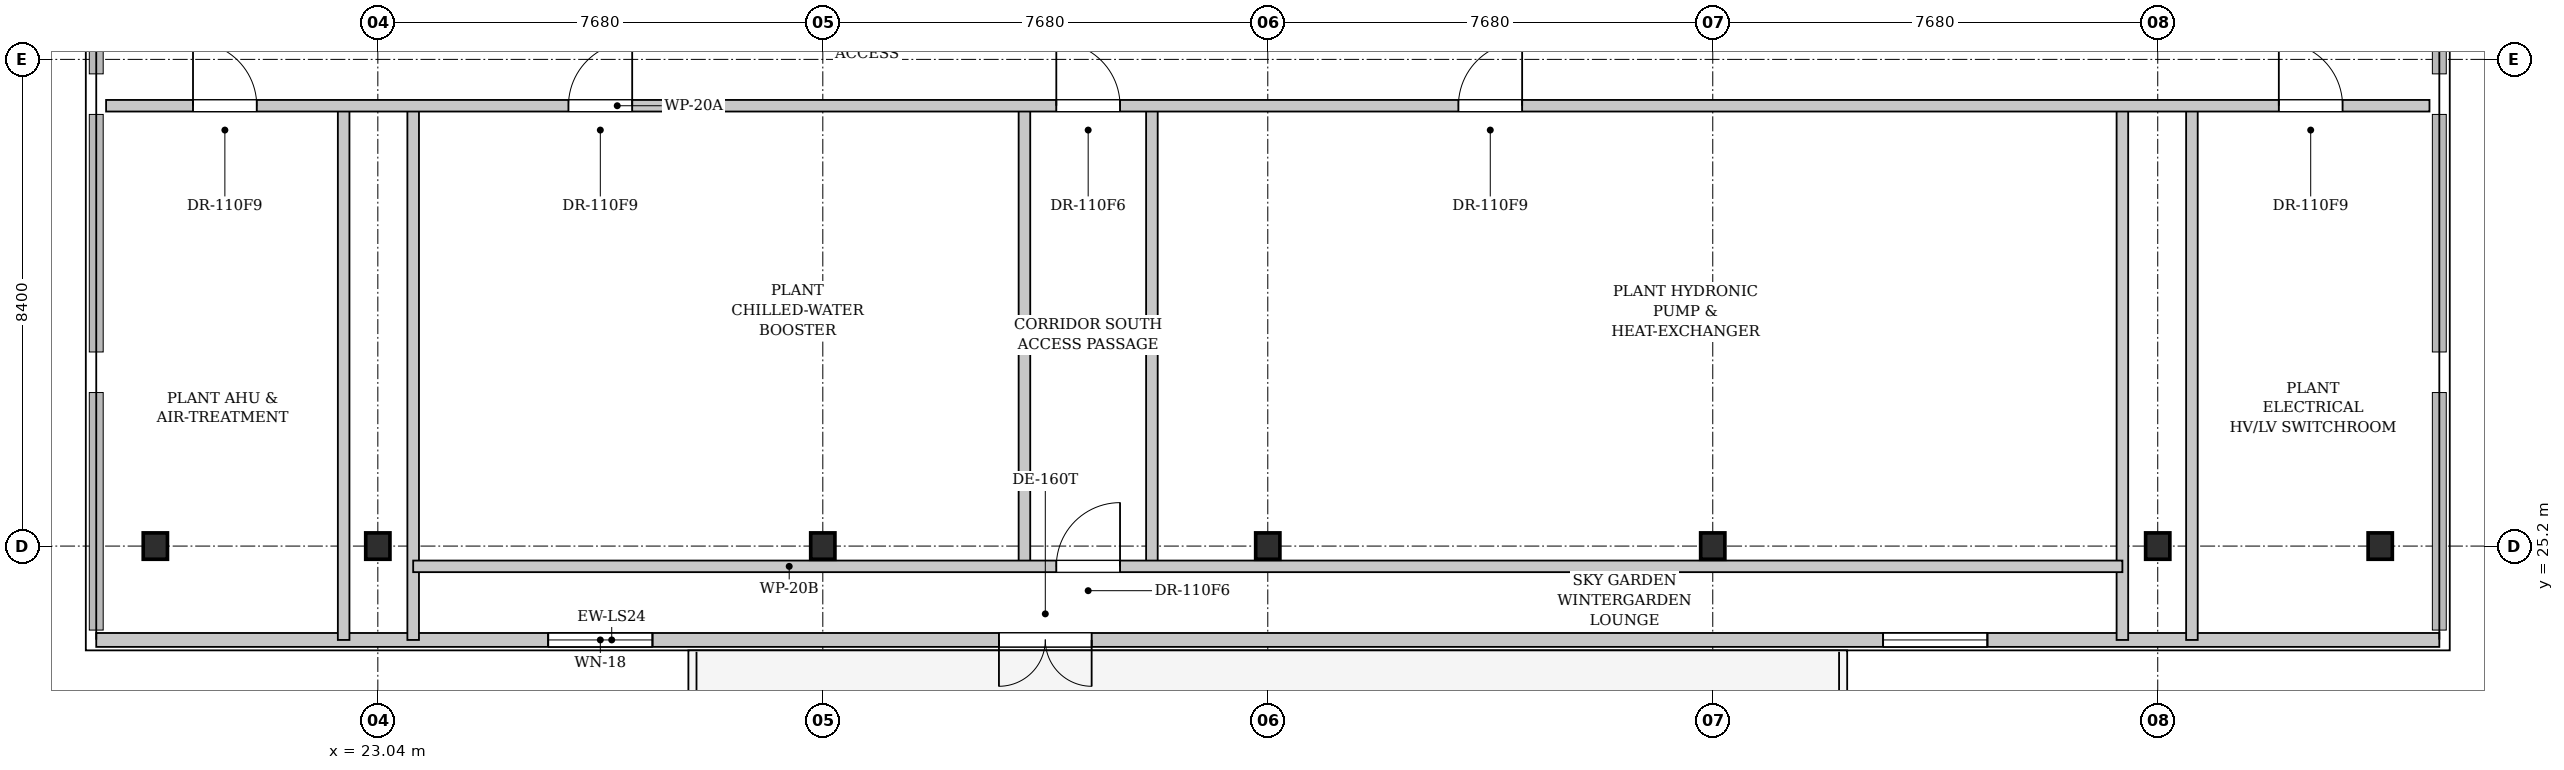
"""IFC4 building model, lengths in metres.
Left out: names, types, materials, properties, quantities, classifications, styles, units other than length and angle.
Written with IfcOpenShell. Run it as: python <this file> out.ifc"""

import sys

from ifc_helpers import new_model, si_unit, direction, frame, frame_2d, origin, origin_2d, place, context, subcontext, project, spatial, rectangle, i_section, extrude, element, fill, save


model = new_model("IFC4")
c1 = context("Model", 3, precision=1e-05, world=origin(), true_north=direction((0.0, 1.0)))
c2 = subcontext(c1, "Body", "Model", "MODEL_VIEW")
j1 = project(units=[si_unit("LENGTHUNIT", "METRE"), si_unit("PLANEANGLEUNIT", "RADIAN")], contexts=[c1])
p1 = place(None, origin())
s1 = spatial("IfcSite", under=j1, at=p1, CompositionType="ELEMENT")
p2 = place(p1, origin())
s2 = spatial("IfcBuilding", under=s1, at=p2, CompositionType="ELEMENT")
p3 = place(p2, frame((0.0, 0.0, 191.9)))
s3 = spatial("IfcBuildingStorey", under=s2, at=p3, CompositionType="ELEMENT", Elevation=191.9)
for number, where, z_axis, x_axis in (
    (1, (23.04, 25.2, 0.0), (0.0, 0.0, 1.0), (1.0, 0.0, 0.0)),
    (2, (30.72, 25.2, 0.0), (0.0, 0.0, 1.0), (1.0, 0.0, 0.0)),
    (3, (38.4, 25.2, 0.0), (0.0, 0.0, 1.0), (1.0, 0.0, 0.0)),
    (4, (46.08, 25.2, 0.0), (0.0, 0.0, 1.0), (1.0, 0.0, 0.0)),
    (5, (53.76, 25.2, 0.0), (0.0, 0.0, 1.0), (1.0, 0.0, 0.0)),
    (6, (19.2, 25.2, 0.0), (0.0, 0.0, 1.0), (1.0, 0.0, 0.0)),
    (7, (57.6, 25.2, 0.0), (0.0, 0.0, 1.0), (1.0, 0.0, 0.0)),
):
    element("IfcColumn", number, at=place(p3, frame(where, z_axis=z_axis, x_axis=x_axis)), inside=s3, PredefinedType="COLUMN", context=c2, shape_type="SweptSolid", body=[
        extrude(i_section(OverallWidth=0.418, OverallDepth=0.455, WebThickness=0.042, FlangeThickness=0.068, FilletRadius=0.015, at=origin_2d()), origin(), (0.0, 0.0, 1.0), 4.2),
    ])
p4 = place(p3, frame((18.18, 23.58, 0.0), z_axis=(0.0, 0.0, 1.0), x_axis=(1.0, 0.0, 0.0)))
e8 = element("IfcWall", 8, at=p4, inside=s3, PredefinedType="SOLIDWALL", context=c2, shape_type="SweptSolid", body=[
    extrude(rectangle(XDim=40.44, YDim=0.24, at=frame_2d((20.22, 0.0))), origin(), (0.0, 0.0, 1.0), 3.98),
])
p5 = place(p4, frame((15.58, 0.0, 0.0)))
e9 = element("IfcOpeningElement", 9, at=p5, cuts=e8, PredefinedType="OPENING", context=c2, shape_type="SweptSolid", body=[
    extrude(rectangle(XDim=1.6, YDim=2.25, at=frame_2d((0.8, 1.125))), frame((0.0, 0.13, 0.0), z_axis=(0.0, -1.0, 0.0), x_axis=(1.0, 0.0, 0.0)), (0.0, 0.0, 1.0), 0.26),
])
p6 = place(p4, frame((7.8, 0.0, 0.9)))
e10 = element("IfcOpeningElement", 10, at=p6, cuts=e8, PredefinedType="OPENING", context=c2, shape_type="SweptSolid", body=[
    extrude(rectangle(XDim=1.8, YDim=2.0, at=frame_2d((0.9, 1.0))), frame((0.0, 0.13, 0.0), z_axis=(0.0, -1.0, 0.0), x_axis=(1.0, 0.0, 0.0)), (0.0, 0.0, 1.0), 0.26),
])
p7 = place(p4, frame((30.84, 0.0, 0.9)))
e11 = element("IfcOpeningElement", 11, at=p7, cuts=e8, PredefinedType="OPENING", context=c2, shape_type="SweptSolid", body=[
    extrude(rectangle(XDim=1.8, YDim=2.0, at=frame_2d((0.9, 1.0))), frame((0.0, 0.13, 0.0), z_axis=(0.0, -1.0, 0.0), x_axis=(1.0, 0.0, 0.0)), (0.0, 0.0, 1.0), 0.26),
])
for number, where, z_axis, x_axis in (
    (12, (22.45, 23.58, 0.0), (0.0, 0.0, 1.0), (0.0, 1.0, 0.0)),
    (13, (23.65, 23.58, 0.0), (0.0, 0.0, 1.0), (0.0, 1.0, 0.0)),
    (14, (53.15, 23.58, 0.0), (0.0, 0.0, 1.0), (0.0, 1.0, 0.0)),
    (15, (54.35, 23.58, 0.0), (0.0, 0.0, 1.0), (0.0, 1.0, 0.0)),
):
    element("IfcWall", number, at=place(p3, frame(where, z_axis=z_axis, x_axis=x_axis)), inside=s3, PredefinedType="PARTITIONING", context=c2, shape_type="SweptSolid", body=[
        extrude(rectangle(XDim=9.22, YDim=0.2, at=frame_2d((4.61, 0.0))), origin(), (0.0, 0.0, 1.0), 3.98),
    ])
for number, where, z_axis, x_axis in (
    (16, (34.2, 24.85, 0.0), (0.0, 0.0, 1.0), (0.0, 1.0, 0.0)),
    (17, (36.4, 24.85, 0.0), (0.0, 0.0, 1.0), (0.0, 1.0, 0.0)),
):
    element("IfcWall", number, at=place(p3, frame(where, z_axis=z_axis, x_axis=x_axis)), inside=s3, PredefinedType="PARTITIONING", context=c2, shape_type="SweptSolid", body=[
        extrude(rectangle(XDim=7.95, YDim=0.2, at=frame_2d((3.975, 0.0))), origin(), (0.0, 0.0, 1.0), 3.98),
    ])
p8 = place(p3, frame((23.65, 24.85, 0.0), z_axis=(0.0, 0.0, 1.0), x_axis=(1.0, 0.0, 0.0)))
e18 = element("IfcWall", 18, at=p8, inside=s3, PredefinedType="PARTITIONING", context=c2, shape_type="SweptSolid", body=[
    extrude(rectangle(XDim=29.5, YDim=0.2, at=frame_2d((14.75, 0.0))), origin(), (0.0, 0.0, 1.0), 3.98),
])
p9 = place(p8, frame((11.1, 0.0, 0.0)))
e19 = element("IfcOpeningElement", 19, at=p9, cuts=e18, PredefinedType="OPENING", context=c2, shape_type="SweptSolid", body=[
    extrude(rectangle(XDim=1.1, YDim=2.15, at=frame_2d((0.55, 1.075))), frame((0.0, 0.11, 0.0), z_axis=(0.0, -1.0, 0.0), x_axis=(1.0, 0.0, 0.0)), (0.0, 0.0, 1.0), 0.22),
])
p10 = place(p3, frame((18.35, 32.8, 0.0), z_axis=(0.0, 0.0, 1.0), x_axis=(1.0, 0.0, 0.0)))
e20 = element("IfcWall", 20, at=p10, inside=s3, PredefinedType="PARTITIONING", context=c2, shape_type="SweptSolid", body=[
    extrude(rectangle(XDim=40.1, YDim=0.2, at=frame_2d((20.05, 0.0))), origin(), (0.0, 0.0, 1.0), 3.98),
])
p11 = place(p10, frame((1.5, 0.0, 0.0)))
e21 = element("IfcOpeningElement", 21, at=p11, cuts=e20, PredefinedType="OPENING", context=c2, shape_type="SweptSolid", body=[
    extrude(rectangle(XDim=1.1, YDim=2.15, at=frame_2d((0.55, 1.075))), frame((0.0, 0.11, 0.0), z_axis=(0.0, -1.0, 0.0), x_axis=(1.0, 0.0, 0.0)), (0.0, 0.0, 1.0), 0.22),
])
p12 = place(p10, frame((7.98, 0.0, 0.0)))
e22 = element("IfcOpeningElement", 22, at=p12, cuts=e20, PredefinedType="OPENING", context=c2, shape_type="SweptSolid", body=[
    extrude(rectangle(XDim=1.1, YDim=2.15, at=frame_2d((0.55, 1.075))), frame((0.0, 0.11, 0.0), z_axis=(0.0, -1.0, 0.0), x_axis=(1.0, 0.0, 0.0)), (0.0, 0.0, 1.0), 0.22),
])
p13 = place(p10, frame((16.4, 0.0, 0.0)))
e23 = element("IfcOpeningElement", 23, at=p13, cuts=e20, PredefinedType="OPENING", context=c2, shape_type="SweptSolid", body=[
    extrude(rectangle(XDim=1.1, YDim=2.15, at=frame_2d((0.55, 1.075))), frame((0.0, 0.11, 0.0), z_axis=(0.0, -1.0, 0.0), x_axis=(1.0, 0.0, 0.0)), (0.0, 0.0, 1.0), 0.22),
])
p14 = place(p10, frame((23.34, 0.0, 0.0)))
e24 = element("IfcOpeningElement", 24, at=p14, cuts=e20, PredefinedType="OPENING", context=c2, shape_type="SweptSolid", body=[
    extrude(rectangle(XDim=1.1, YDim=2.15, at=frame_2d((0.55, 1.075))), frame((0.0, 0.11, 0.0), z_axis=(0.0, -1.0, 0.0), x_axis=(1.0, 0.0, 0.0)), (0.0, 0.0, 1.0), 0.22),
])
p15 = place(p10, frame((37.5, 0.0, 0.0)))
e25 = element("IfcOpeningElement", 25, at=p15, cuts=e20, PredefinedType="OPENING", context=c2, shape_type="SweptSolid", body=[
    extrude(rectangle(XDim=1.1, YDim=2.15, at=frame_2d((0.55, 1.075))), frame((0.0, 0.11, 0.0), z_axis=(0.0, -1.0, 0.0), x_axis=(1.0, 0.0, 0.0)), (0.0, 0.0, 1.0), 0.22),
])
p16 = place(p5, frame((1.6, 0.0, 0.0), z_axis=(0.0, 0.0, 1.0), x_axis=(-1.0, 0.0, 0.0)))
e26 = element("IfcDoor", 26, at=p16, inside=s3, OperationType="SINGLE_SWING_LEFT", PredefinedType="DOOR", context=c2, shape_type="SweptSolid", body=[
    extrude(rectangle(XDim=1.6, YDim=2.25, at=frame_2d((0.8, 1.125))), frame((0.0, 0.025, 0.0), z_axis=(0.0, -1.0, 0.0), x_axis=(1.0, 0.0, 0.0)), (0.0, 0.0, 1.0), 0.05),
])
fill(e9, e26)
p17 = place(p6, origin())
e27 = element("IfcWindow", 27, at=p17, inside=s3, PartitioningType="SINGLE_PANEL", PredefinedType="WINDOW", context=c2, shape_type="SweptSolid", body=[
    extrude(rectangle(XDim=1.8, YDim=2.0, at=frame_2d((0.9, 1.0))), frame((0.0, 0.03, 0.0), z_axis=(0.0, -1.0, 0.0), x_axis=(1.0, 0.0, 0.0)), (0.0, 0.0, 1.0), 0.06),
])
fill(e10, e27)
p18 = place(p7, origin())
e28 = element("IfcWindow", 28, at=p18, inside=s3, PartitioningType="SINGLE_PANEL", PredefinedType="WINDOW", context=c2, shape_type="SweptSolid", body=[
    extrude(rectangle(XDim=1.8, YDim=2.0, at=frame_2d((0.9, 1.0))), frame((0.0, 0.03, 0.0), z_axis=(0.0, -1.0, 0.0), x_axis=(1.0, 0.0, 0.0)), (0.0, 0.0, 1.0), 0.06),
])
fill(e11, e28)
p19 = place(p9, origin())
e29 = element("IfcDoor", 29, at=p19, inside=s3, OperationType="SINGLE_SWING_RIGHT", PredefinedType="DOOR", context=c2, shape_type="SweptSolid", body=[
    extrude(rectangle(XDim=1.1, YDim=2.15, at=frame_2d((0.55, 1.075))), frame((0.0, 0.025, 0.0), z_axis=(0.0, -1.0, 0.0), x_axis=(1.0, 0.0, 0.0)), (0.0, 0.0, 1.0), 0.05),
])
fill(e19, e29)
p20 = place(p11, origin())
e30 = element("IfcDoor", 30, at=p20, inside=s3, OperationType="SINGLE_SWING_LEFT", PredefinedType="DOOR", context=c2, shape_type="SweptSolid", body=[
    extrude(rectangle(XDim=1.1, YDim=2.15, at=frame_2d((0.55, 1.075))), frame((0.0, 0.025, 0.0), z_axis=(0.0, -1.0, 0.0), x_axis=(1.0, 0.0, 0.0)), (0.0, 0.0, 1.0), 0.05),
])
fill(e21, e30)
p21 = place(p12, origin())
e31 = element("IfcDoor", 31, at=p21, inside=s3, OperationType="SINGLE_SWING_RIGHT", PredefinedType="DOOR", context=c2, shape_type="SweptSolid", body=[
    extrude(rectangle(XDim=1.1, YDim=2.15, at=frame_2d((0.55, 1.075))), frame((0.0, 0.025, 0.0), z_axis=(0.0, -1.0, 0.0), x_axis=(1.0, 0.0, 0.0)), (0.0, 0.0, 1.0), 0.05),
])
fill(e22, e31)
p22 = place(p13, origin())
e32 = element("IfcDoor", 32, at=p22, inside=s3, OperationType="SINGLE_SWING_LEFT", PredefinedType="DOOR", context=c2, shape_type="SweptSolid", body=[
    extrude(rectangle(XDim=1.1, YDim=2.15, at=frame_2d((0.55, 1.075))), frame((0.0, 0.025, 0.0), z_axis=(0.0, -1.0, 0.0), x_axis=(1.0, 0.0, 0.0)), (0.0, 0.0, 1.0), 0.05),
])
fill(e23, e32)
p23 = place(p14, origin())
e33 = element("IfcDoor", 33, at=p23, inside=s3, OperationType="SINGLE_SWING_RIGHT", PredefinedType="DOOR", context=c2, shape_type="SweptSolid", body=[
    extrude(rectangle(XDim=1.1, YDim=2.15, at=frame_2d((0.55, 1.075))), frame((0.0, 0.025, 0.0), z_axis=(0.0, -1.0, 0.0), x_axis=(1.0, 0.0, 0.0)), (0.0, 0.0, 1.0), 0.05),
])
fill(e24, e33)
p24 = place(p15, origin())
e34 = element("IfcDoor", 34, at=p24, inside=s3, OperationType="SINGLE_SWING_LEFT", PredefinedType="DOOR", context=c2, shape_type="SweptSolid", body=[
    extrude(rectangle(XDim=1.1, YDim=2.15, at=frame_2d((0.55, 1.075))), frame((0.0, 0.025, 0.0), z_axis=(0.0, -1.0, 0.0), x_axis=(1.0, 0.0, 0.0)), (0.0, 0.0, 1.0), 0.05),
])
fill(e25, e34)
save(model, sys.argv[1])
